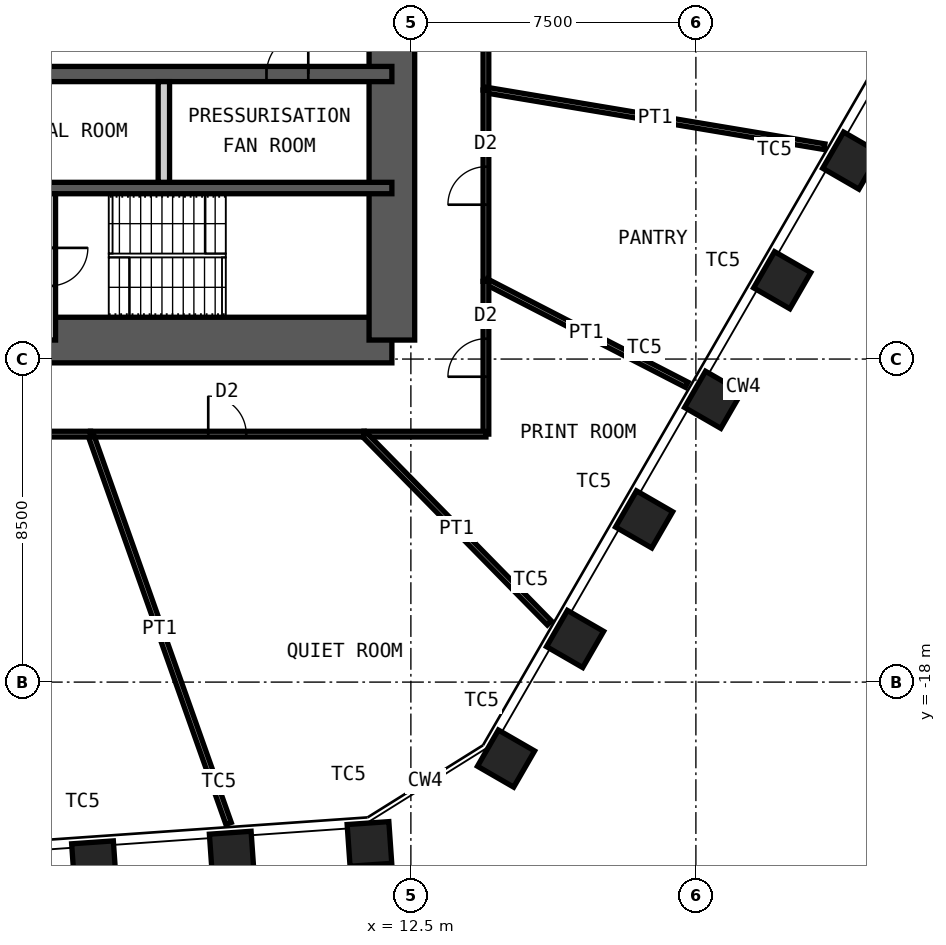
"""IFC4 building model, lengths in metres.
Left out: names, types, materials, properties, quantities, classifications, styles, units other than length and angle.
Written with IfcOpenShell. Run it as: python <this file> out.ifc"""

import sys

from ifc_helpers import new_model, si_unit, direction, frame, frame_2d, origin, origin_2d, place, context, subcontext, project, spatial, rectangle, hollow_rectangle, extrude, element, fill, save


model = new_model("IFC4")
c1 = context("Model", 3, precision=1e-05, world=origin(), true_north=direction((0.0, 1.0)))
c2 = subcontext(c1, "Body", "Model", "MODEL_VIEW")
j1 = project(units=[si_unit("LENGTHUNIT", "METRE"), si_unit("PLANEANGLEUNIT", "RADIAN")], contexts=[c1])
p1 = place(None, origin())
s1 = spatial("IfcSite", under=j1, at=p1, CompositionType="ELEMENT")
p2 = place(p1, origin())
s2 = spatial("IfcBuilding", under=s1, at=p2, CompositionType="ELEMENT")
p3 = place(p2, frame((0.0, 0.0, 184.6)))
s3 = spatial("IfcBuildingStorey", under=s2, at=p3, CompositionType="ELEMENT", Elevation=184.6)
for number, where, z_axis, x_axis in (
    (1, (24.088, -4.279, 0.0), (0.0, 0.0, 1.0), (0.5, 0.866, 0.0)),
    (2, (22.271, -7.426, 0.0), (0.0, 0.0, 1.0), (0.5, 0.866, 0.0)),
    (3, (20.454, -10.572, 0.0), (0.0, 0.0, 1.0), (0.5, 0.866, 0.0)),
    (4, (18.637, -13.719, 0.0), (0.0, 0.0, 1.0), (0.5, 0.866, 0.0)),
    (5, (16.821, -16.866, 0.0), (0.0, 0.0, 1.0), (0.5, 0.866, 0.0)),
    (6, (15.004, -20.012, 0.0), (0.0, 0.0, 1.0), (0.5, 0.866, 0.0)),
    (7, (11.41, -22.258, 0.0), (0.0, 0.0, 1.0), (0.998, 0.07, 0.0)),
    (8, (7.785, -22.512, 0.0), (0.0, 0.0, 1.0), (0.998, 0.07, 0.0)),
    (9, (4.16, -22.765, 0.0), (0.0, 0.0, 1.0), (0.998, 0.07, 0.0)),
):
    element("IfcColumn", number, at=place(p3, frame(where, z_axis=z_axis, x_axis=x_axis)), inside=s3, PredefinedType="COLUMN", context=c2, shape_type="SweptSolid", body=[
        extrude(hollow_rectangle(XDim=1.1, YDim=1.1, WallThickness=0.07, at=origin_2d()), origin(), (0.0, 0.0, 1.0), 4.2),
    ])
p4 = place(p3, frame((-12.0, -9.0, 0.0), z_axis=(0.0, 0.0, 1.0), x_axis=(1.0, 0.0, 0.0)))
e10 = element("IfcWall", 10, at=p4, inside=s3, PredefinedType="SHEAR", context=c2, shape_type="SweptSolid", body=[
    extrude(rectangle(XDim=24.0, YDim=1.2, at=frame_2d((12.0, 0.0))), origin(), (0.0, 0.0, 1.0), 4.2),
])
p5 = place(p4, frame((1.35, 0.0, 0.0)))
e11 = element("IfcOpeningElement", 11, at=p5, cuts=e10, PredefinedType="OPENING", context=c2, shape_type="SweptSolid", body=[
    extrude(rectangle(XDim=1.0, YDim=2.1, at=frame_2d((0.5, 1.05))), frame((0.0, 0.61, 0.0), z_axis=(0.0, -1.0, 0.0), x_axis=(1.0, 0.0, 0.0)), (0.0, 0.0, 1.0), 1.22),
])
p6 = place(p4, frame((5.325, 0.0, 0.0)))
e12 = element("IfcOpeningElement", 12, at=p6, cuts=e10, PredefinedType="OPENING", context=c2, shape_type="SweptSolid", body=[
    extrude(rectangle(XDim=1.15, YDim=2.1, at=frame_2d((0.575, 1.05))), frame((0.0, 0.61, 0.0), z_axis=(0.0, -1.0, 0.0), x_axis=(1.0, 0.0, 0.0)), (0.0, 0.0, 1.0), 1.22),
])
p7 = place(p4, frame((12.6, 0.0, 0.0)))
e13 = element("IfcOpeningElement", 13, at=p7, cuts=e10, PredefinedType="OPENING", context=c2, shape_type="SweptSolid", body=[
    extrude(rectangle(XDim=1.0, YDim=2.1, at=frame_2d((0.5, 1.05))), frame((0.0, 0.61, 0.0), z_axis=(0.0, -1.0, 0.0), x_axis=(1.0, 0.0, 0.0)), (0.0, 0.0, 1.0), 1.22),
])
p8 = place(p3, frame((12.0, -9.0, 0.0), z_axis=(0.0, 0.0, 1.0), x_axis=(0.0, 1.0, 0.0)))
e14 = element("IfcWall", 14, at=p8, inside=s3, PredefinedType="SHEAR", context=c2, shape_type="SweptSolid", body=[
    extrude(rectangle(XDim=18.0, YDim=1.2, at=frame_2d((9.0, 0.0))), origin(), (0.0, 0.0, 1.0), 4.2),
])
p9 = place(p8, frame((8.1, 0.0, 0.0)))
e15 = element("IfcOpeningElement", 15, at=p9, cuts=e14, PredefinedType="OPENING", context=c2, shape_type="SweptSolid", body=[
    extrude(rectangle(XDim=1.8, YDim=2.1, at=frame_2d((0.9, 1.05))), frame((0.0, 0.61, 0.0), z_axis=(0.0, -1.0, 0.0), x_axis=(1.0, 0.0, 0.0)), (0.0, 0.0, 1.0), 1.22),
])
p10 = place(p3, frame((-12.0, -2.0, 0.0), z_axis=(0.0, 0.0, 1.0), x_axis=(1.0, 0.0, 0.0)))
e16 = element("IfcWall", 16, at=p10, inside=s3, PredefinedType="SHEAR", context=c2, shape_type="SweptSolid", body=[
    extrude(rectangle(XDim=24.0, YDim=0.4, at=frame_2d((12.0, 0.0))), origin(), (0.0, 0.0, 1.0), 4.2),
])
p11 = place(p10, frame((1.1, 0.0, 0.0)))
e17 = element("IfcOpeningElement", 17, at=p11, cuts=e16, PredefinedType="OPENING", context=c2, shape_type="SweptSolid", body=[
    extrude(rectangle(XDim=1.1, YDim=2.1, at=frame_2d((0.55, 1.05))), frame((0.0, 0.21, 0.0), z_axis=(0.0, -1.0, 0.0), x_axis=(1.0, 0.0, 0.0)), (0.0, 0.0, 1.0), 0.42),
])
p12 = place(p10, frame((13.55, 0.0, 0.0)))
e18 = element("IfcOpeningElement", 18, at=p12, cuts=e16, PredefinedType="OPENING", context=c2, shape_type="SweptSolid", body=[
    extrude(rectangle(XDim=1.1, YDim=2.1, at=frame_2d((0.55, 1.05))), frame((0.0, 0.21, 0.0), z_axis=(0.0, -1.0, 0.0), x_axis=(1.0, 0.0, 0.0)), (0.0, 0.0, 1.0), 0.42),
])
p13 = place(p10, frame((20.7, 0.0, 0.0)))
e19 = element("IfcOpeningElement", 19, at=p13, cuts=e16, PredefinedType="OPENING", context=c2, shape_type="SweptSolid", body=[
    extrude(rectangle(XDim=1.1, YDim=2.1, at=frame_2d((0.55, 1.05))), frame((0.0, 0.21, 0.0), z_axis=(0.0, -1.0, 0.0), x_axis=(1.0, 0.0, 0.0)), (0.0, 0.0, 1.0), 0.42),
])
p14 = place(p10, frame((4.0, 0.0, 0.0)))
e20 = element("IfcOpeningElement", 20, at=p14, cuts=e16, PredefinedType="OPENING", context=c2, shape_type="SweptSolid", body=[
    extrude(rectangle(XDim=1.0, YDim=2.1, at=frame_2d((0.5, 1.05))), frame((0.0, 0.21, 0.0), z_axis=(0.0, -1.0, 0.0), x_axis=(1.0, 0.0, 0.0)), (0.0, 0.0, 1.0), 0.42),
])
p15 = place(p3, frame((-12.0, -5.0, 0.0), z_axis=(0.0, 0.0, 1.0), x_axis=(1.0, 0.0, 0.0)))
e21 = element("IfcWall", 21, at=p15, inside=s3, PredefinedType="SHEAR", context=c2, shape_type="SweptSolid", body=[
    extrude(rectangle(XDim=24.0, YDim=0.3, at=frame_2d((12.0, 0.0))), origin(), (0.0, 0.0, 1.0), 4.2),
])
p16 = place(p3, frame((6.0, -4.85, 0.0), z_axis=(0.0, 0.0, 1.0), x_axis=(0.0, 1.0, 0.0)))
e22 = element("IfcWall", 22, at=p16, inside=s3, PredefinedType="PARTITIONING", context=c2, shape_type="SweptSolid", body=[
    extrude(rectangle(XDim=2.65, YDim=0.3, at=frame_2d((1.325, 0.0))), origin(), (0.0, 0.0, 1.0), 3.98),
])
p17 = place(p3, frame((3.0, -9.0, 0.0), z_axis=(0.0, 0.0, 1.0), x_axis=(0.0, 1.0, 0.0)))
e23 = element("IfcWall", 23, at=p17, inside=s3, PredefinedType="PARTITIONING", context=c2, shape_type="SweptSolid", body=[
    extrude(rectangle(XDim=3.85, YDim=0.3, at=frame_2d((1.925, 0.0))), origin(), (0.0, 0.0, 1.0), 3.98),
])
p18 = place(p17, frame((1.425, 0.0, 0.0)))
e24 = element("IfcOpeningElement", 24, at=p18, cuts=e23, PredefinedType="OPENING", context=c2, shape_type="SweptSolid", body=[
    extrude(rectangle(XDim=1.0, YDim=2.1, at=frame_2d((0.5, 1.05))), frame((0.0, 0.16, 0.0), z_axis=(0.0, -1.0, 0.0), x_axis=(1.0, 0.0, 0.0)), (0.0, 0.0, 1.0), 0.32),
])
p19 = place(p3, frame((14.475, 5.874, 0.0), z_axis=(0.0, 0.0, 1.0), x_axis=(0.0, -1.0, 0.0)))
e25 = element("IfcWall", 25, at=p19, inside=s3, PredefinedType="PARTITIONING", context=c2, shape_type="SweptSolid", body=[
    extrude(rectangle(XDim=8.296, YDim=0.15, at=frame_2d((4.148, 0.0))), origin(), (0.0, 0.0, 1.0), 4.03),
])
p20 = place(p19, frame((3.248, 0.0, 0.0)))
e26 = element("IfcOpeningElement", 26, at=p20, cuts=e25, PredefinedType="OPENING", context=c2, shape_type="SweptSolid", body=[
    extrude(rectangle(XDim=1.8, YDim=2.4, at=frame_2d((0.9, 1.2))), frame((0.0, 0.085, 0.0), z_axis=(0.0, -1.0, 0.0), x_axis=(1.0, 0.0, 0.0)), (0.0, 0.0, 1.0), 0.17),
])
p21 = place(p3, frame((23.383, -3.912, 0.0), z_axis=(0.0, 0.0, 1.0), x_axis=(-0.986293651891, 0.164999491631, 0.0)))
e27 = element("IfcWall", 27, at=p21, inside=s3, PredefinedType="PARTITIONING", context=c2, shape_type="SweptSolid", body=[
    extrude(rectangle(XDim=9.032, YDim=0.15, at=frame_2d((4.516, 0.0))), origin(), (0.0, 0.0, 1.0), 3.43),
])
p22 = place(p3, frame((14.475, -2.422, 0.0), z_axis=(0.0, 0.0, 1.0), x_axis=(0.0, -1.0, 0.0)))
e28 = element("IfcWall", 28, at=p22, inside=s3, PredefinedType="PARTITIONING", context=c2, shape_type="SweptSolid", body=[
    extrude(rectangle(XDim=5.033, YDim=0.15, at=frame_2d((2.517, 0.0))), origin(), (0.0, 0.0, 1.0), 4.03),
])
p23 = place(p22, frame((2.017, 0.0, 0.0)))
e29 = element("IfcOpeningElement", 29, at=p23, cuts=e28, PredefinedType="OPENING", context=c2, shape_type="SweptSolid", body=[
    extrude(rectangle(XDim=1.0, YDim=2.4, at=frame_2d((0.5, 1.2))), frame((0.0, 0.085, 0.0), z_axis=(0.0, -1.0, 0.0), x_axis=(1.0, 0.0, 0.0)), (0.0, 0.0, 1.0), 0.17),
])
p24 = place(p3, frame((19.759, -10.177, 0.0), z_axis=(0.0, 0.0, 1.0), x_axis=(-0.889015092721, 0.457877893017, 0.0)))
e30 = element("IfcWall", 30, at=p24, inside=s3, PredefinedType="PARTITIONING", context=c2, shape_type="SweptSolid", body=[
    extrude(rectangle(XDim=5.944, YDim=0.15, at=frame_2d((2.972, 0.0))), origin(), (0.0, 0.0, 1.0), 3.43),
])
p25 = place(p3, frame((14.475, -7.455, 0.0), z_axis=(0.0, 0.0, 1.0), x_axis=(0.0, -1.0, 0.0)))
e31 = element("IfcWall", 31, at=p25, inside=s3, PredefinedType="PARTITIONING", context=c2, shape_type="SweptSolid", body=[
    extrude(rectangle(XDim=4.02, YDim=0.15, at=frame_2d((2.01, 0.0))), origin(), (0.0, 0.0, 1.0), 4.03),
])
p26 = place(p25, frame((1.51, 0.0, 0.0)))
e32 = element("IfcOpeningElement", 32, at=p26, cuts=e31, PredefinedType="OPENING", context=c2, shape_type="SweptSolid", body=[
    extrude(rectangle(XDim=1.0, YDim=2.4, at=frame_2d((0.5, 1.2))), frame((0.0, 0.085, 0.0), z_axis=(0.0, -1.0, 0.0), x_axis=(1.0, 0.0, 0.0)), (0.0, 0.0, 1.0), 0.17),
])
p27 = place(p3, frame((14.475, -11.475, 0.0), z_axis=(0.0, 0.0, 1.0), x_axis=(-1.0, 0.0, 0.0)))
e33 = element("IfcWall", 33, at=p27, inside=s3, PredefinedType="PARTITIONING", context=c2, shape_type="SweptSolid", body=[
    extrude(rectangle(XDim=3.209, YDim=0.15, at=frame_2d((1.605, 0.0))), origin(), (0.0, 0.0, 1.0), 4.03),
])
p28 = place(p3, frame((16.145, -16.444, 0.0), z_axis=(0.0, 0.0, 1.0), x_axis=(-0.700591378209, 0.71356269576, 0.0)))
e34 = element("IfcWall", 34, at=p28, inside=s3, PredefinedType="PARTITIONING", context=c2, shape_type="SweptSolid", body=[
    extrude(rectangle(XDim=6.964, YDim=0.15, at=frame_2d((3.482, 0.0))), origin(), (0.0, 0.0, 1.0), 3.43),
])
p29 = place(p3, frame((11.266, -11.475, 0.0), z_axis=(0.0, 0.0, 1.0), x_axis=(-1.0, 0.0, 0.0)))
e35 = element("IfcWall", 35, at=p29, inside=s3, PredefinedType="PARTITIONING", context=c2, shape_type="SweptSolid", body=[
    extrude(rectangle(XDim=7.196, YDim=0.15, at=frame_2d((3.598, 0.0))), origin(), (0.0, 0.0, 1.0), 4.03),
])
p30 = place(p29, frame((3.098, 0.0, 0.0)))
e36 = element("IfcOpeningElement", 36, at=p30, cuts=e35, PredefinedType="OPENING", context=c2, shape_type="SweptSolid", body=[
    extrude(rectangle(XDim=1.0, YDim=2.4, at=frame_2d((0.5, 1.2))), frame((0.0, 0.085, 0.0), z_axis=(0.0, -1.0, 0.0), x_axis=(1.0, 0.0, 0.0)), (0.0, 0.0, 1.0), 0.17),
])
p31 = place(p3, frame((7.703, -21.719, 0.0), z_axis=(0.0, 0.0, 1.0), x_axis=(-0.334269551553, 0.942477515331, 0.0)))
e37 = element("IfcWall", 37, at=p31, inside=s3, PredefinedType="PARTITIONING", context=c2, shape_type="SweptSolid", body=[
    extrude(rectangle(XDim=10.869, YDim=0.15, at=frame_2d((5.435, 0.0))), origin(), (0.0, 0.0, 1.0), 3.43),
])
p32 = place(p3, frame((4.07, -11.475, 0.0), z_axis=(0.0, 0.0, 1.0), x_axis=(-1.0, 0.0, 0.0)))
e38 = element("IfcWall", 38, at=p32, inside=s3, PredefinedType="PARTITIONING", context=c2, shape_type="SweptSolid", body=[
    extrude(rectangle(XDim=13.528, YDim=0.15, at=frame_2d((6.764, 0.0))), origin(), (0.0, 0.0, 1.0), 4.03),
])
p33 = place(p32, frame((5.864, 0.0, 0.0)))
e39 = element("IfcOpeningElement", 39, at=p33, cuts=e38, PredefinedType="OPENING", context=c2, shape_type="SweptSolid", body=[
    extrude(rectangle(XDim=1.8, YDim=2.4, at=frame_2d((0.9, 1.2))), frame((0.0, 0.085, 0.0), z_axis=(0.0, -1.0, 0.0), x_axis=(1.0, 0.0, 0.0)), (0.0, 0.0, 1.0), 0.17),
])
p34 = place(p13, origin())
e40 = element("IfcDoor", 40, at=p34, inside=s3, OperationType="SINGLE_SWING_LEFT", PredefinedType="DOOR", context=c2, shape_type="SweptSolid", body=[
    extrude(rectangle(XDim=1.1, YDim=2.1, at=frame_2d((0.55, 1.05))), frame((0.0, 0.025, 0.0), z_axis=(0.0, -1.0, 0.0), x_axis=(1.0, 0.0, 0.0)), (0.0, 0.0, 1.0), 0.05),
])
fill(e19, e40)
p35 = place(p23, origin())
e41 = element("IfcDoor", 41, at=p35, inside=s3, OperationType="SINGLE_SWING_RIGHT", PredefinedType="DOOR", context=c2, shape_type="SweptSolid", body=[
    extrude(rectangle(XDim=1.0, YDim=2.4, at=frame_2d((0.5, 1.2))), frame((0.0, 0.025, 0.0), z_axis=(0.0, -1.0, 0.0), x_axis=(1.0, 0.0, 0.0)), (0.0, 0.0, 1.0), 0.05),
])
fill(e29, e41)
p36 = place(p26, origin())
e42 = element("IfcDoor", 42, at=p36, inside=s3, OperationType="SINGLE_SWING_RIGHT", PredefinedType="DOOR", context=c2, shape_type="SweptSolid", body=[
    extrude(rectangle(XDim=1.0, YDim=2.4, at=frame_2d((0.5, 1.2))), frame((0.0, 0.025, 0.0), z_axis=(0.0, -1.0, 0.0), x_axis=(1.0, 0.0, 0.0)), (0.0, 0.0, 1.0), 0.05),
])
fill(e32, e42)
p37 = place(p30, origin())
e43 = element("IfcDoor", 43, at=p37, inside=s3, OperationType="SINGLE_SWING_RIGHT", PredefinedType="DOOR", context=c2, shape_type="SweptSolid", body=[
    extrude(rectangle(XDim=1.0, YDim=2.4, at=frame_2d((0.5, 1.2))), frame((0.0, 0.025, 0.0), z_axis=(0.0, -1.0, 0.0), x_axis=(1.0, 0.0, 0.0)), (0.0, 0.0, 1.0), 0.05),
])
fill(e36, e43)
save(model, sys.argv[1])
